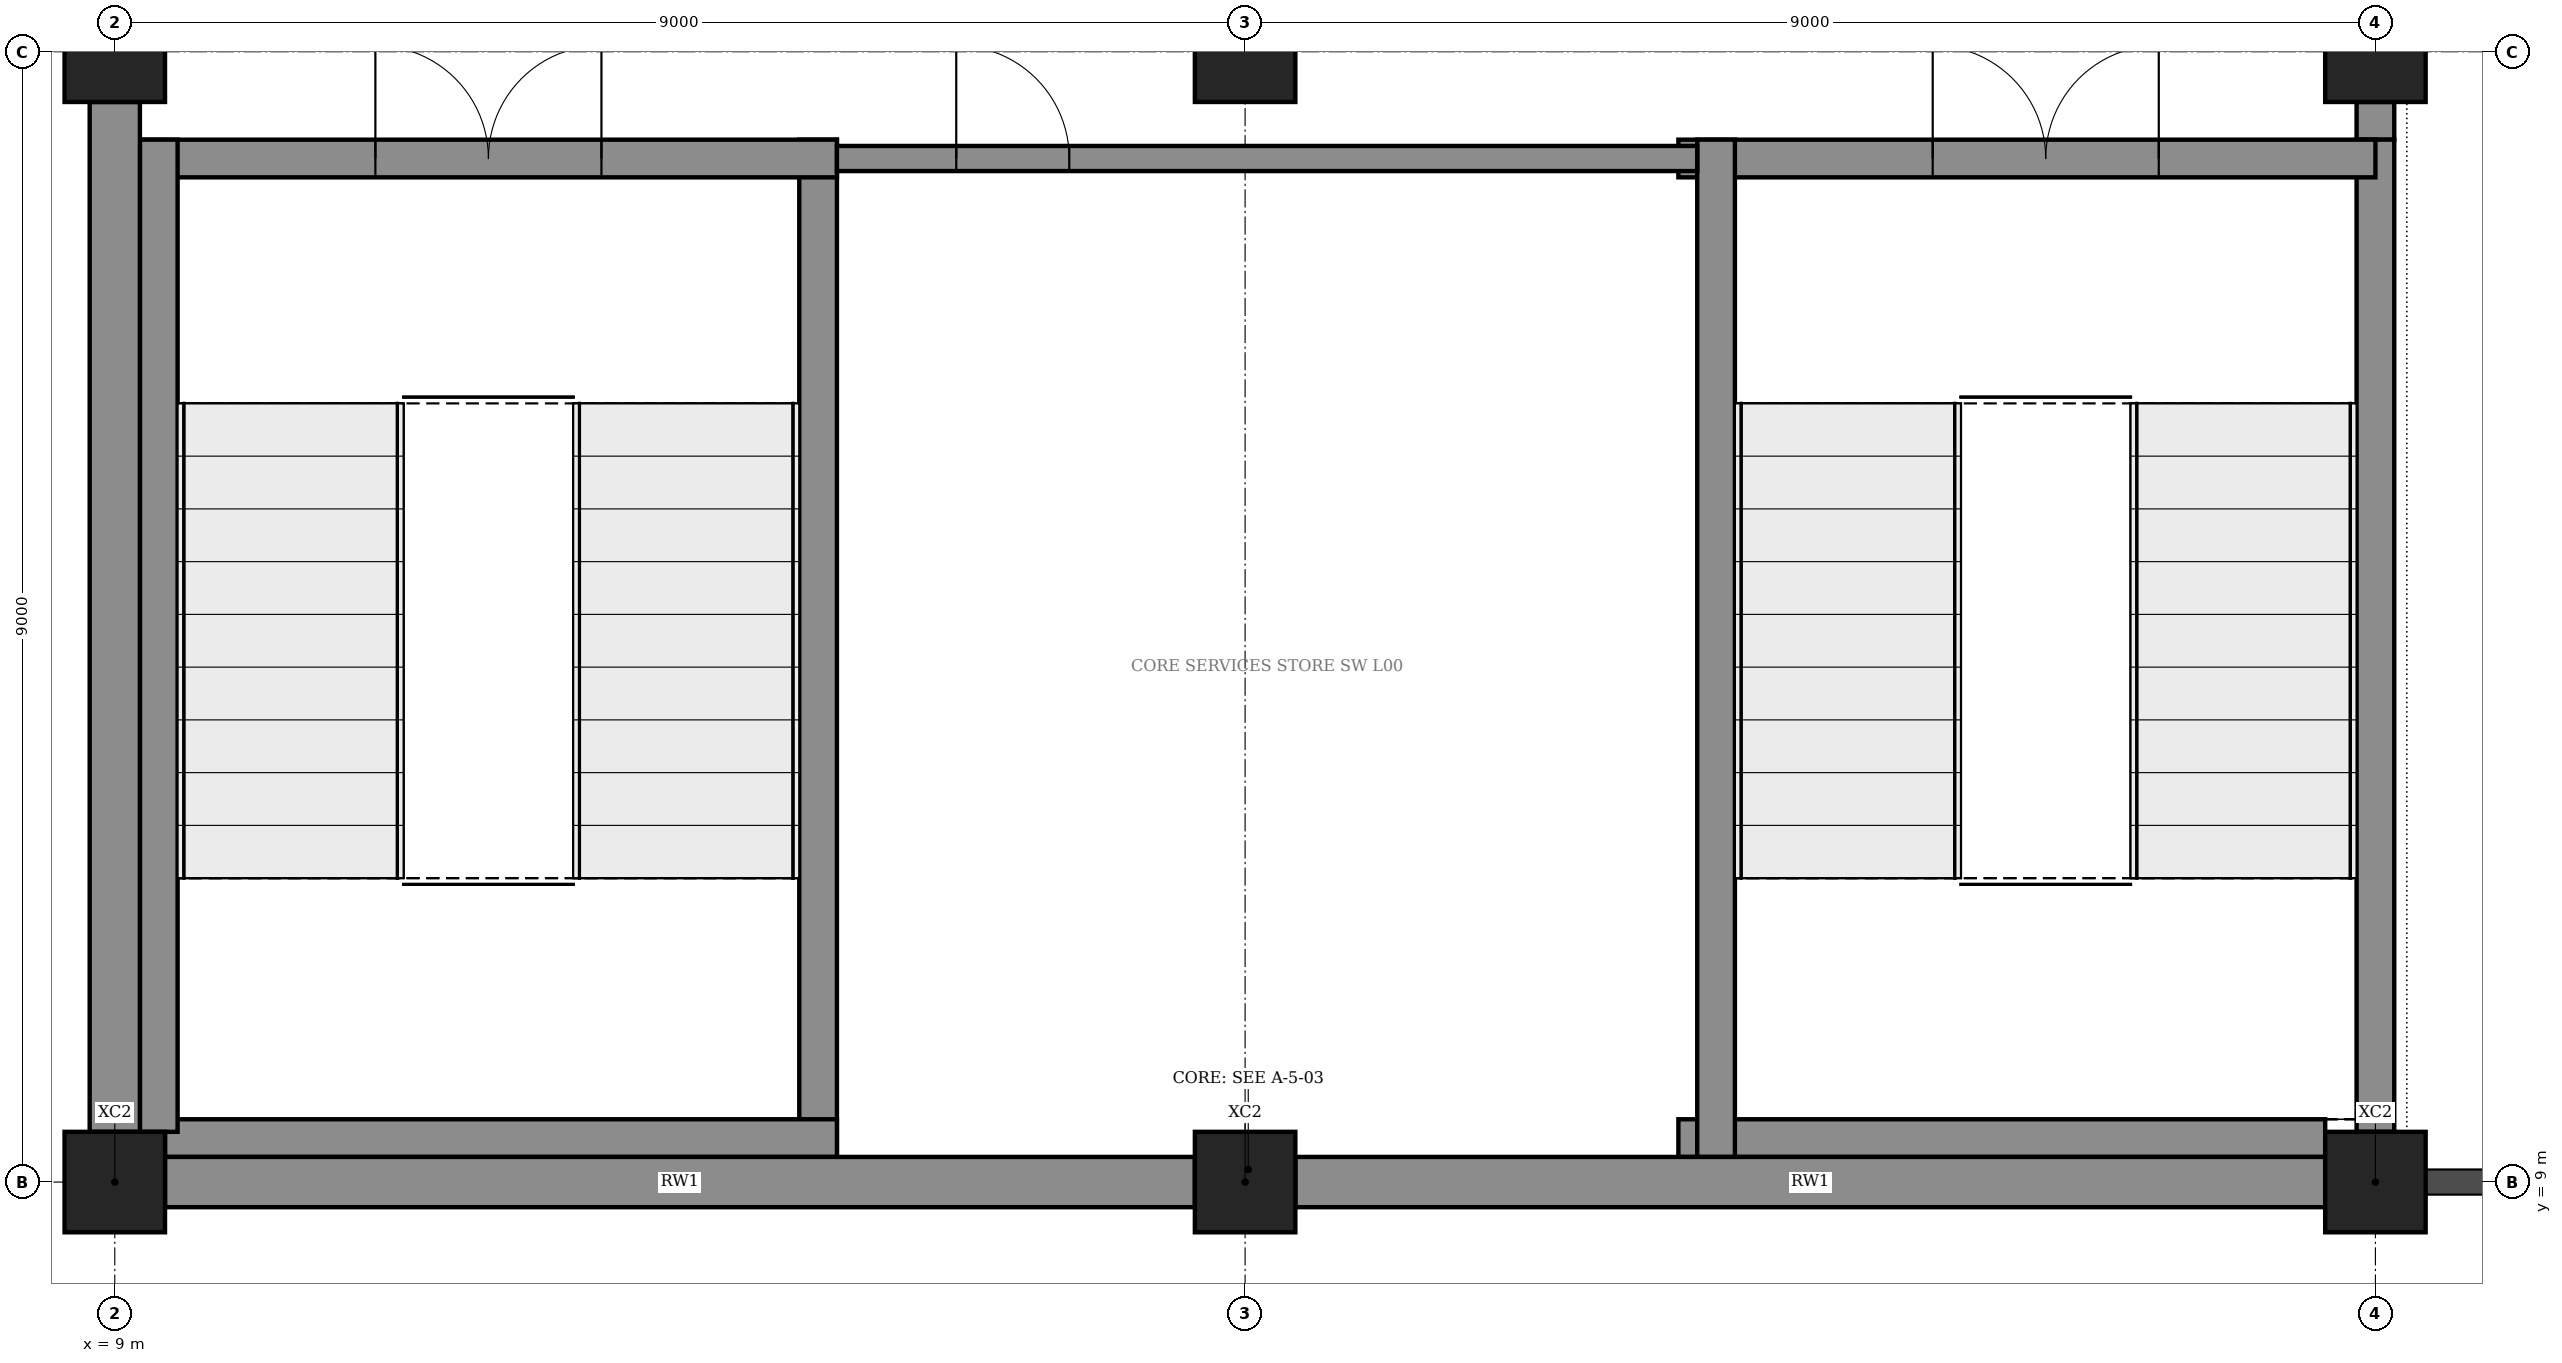
"""IFC4 building model, lengths in metres.
Left out: names, types, materials, properties, quantities, classifications, styles, units other than length and angle.
Written with IfcOpenShell. Run it as: python <this file> out.ifc"""

import sys

from ifc_helpers import new_model, si_unit, direction, frame, frame_2d, origin, origin_2d, place, context, subcontext, project, spatial, rectangle, extrude, element, fill, save


model = new_model("IFC4")
c1 = context("Model", 3, precision=1e-05, world=origin(), true_north=direction((0.0, 1.0)))
c2 = subcontext(c1, "Body", "Model", "MODEL_VIEW")
j1 = project(units=[si_unit("LENGTHUNIT", "METRE"), si_unit("PLANEANGLEUNIT", "RADIAN")], contexts=[c1])
p1 = place(None, origin())
s1 = spatial("IfcSite", under=j1, at=p1, CompositionType="ELEMENT")
p2 = place(p1, origin())
s2 = spatial("IfcBuilding", under=s1, at=p2, CompositionType="ELEMENT")
p3 = place(p2, origin())
s3 = spatial("IfcBuildingStorey", under=s2, at=p3, CompositionType="ELEMENT", Elevation=0.0)
for number, where, z_axis, x_axis in (
    (1, (9.0, 9.0, -0.3), (0.0, 0.0, 1.0), (1.0, 0.0, 0.0)),
    (2, (9.0, 18.0, -0.3), (0.0, 0.0, 1.0), (1.0, 0.0, 0.0)),
    (3, (18.0, 9.0, -0.3), (0.0, 0.0, 1.0), (1.0, 0.0, 0.0)),
    (4, (18.0, 18.0, -0.3), (0.0, 0.0, 1.0), (1.0, 0.0, 0.0)),
    (5, (27.0, 9.0, -0.3), (0.0, 0.0, 1.0), (1.0, 0.0, 0.0)),
    (6, (27.0, 18.0, -0.3), (0.0, 0.0, 1.0), (1.0, 0.0, 0.0)),
):
    element("IfcColumn", number, at=place(p3, frame(where, z_axis=z_axis, x_axis=x_axis)), inside=s3, PredefinedType="COLUMN", context=c2, shape_type="SweptSolid", body=[
        extrude(rectangle(XDim=0.8, YDim=0.8, at=origin_2d()), origin(), (0.0, 0.0, 1.0), 6.3),
    ])
for number, where, z_axis, x_axis in (
    (7, (9.4, 9.0, 0.0), (0.0, 0.0, 1.0), (1.0, 0.0, 0.0)),
    (8, (18.4, 9.0, 0.0), (0.0, 0.0, 1.0), (1.0, 0.0, 0.0)),
    (9, (9.0, 9.4, 0.0), (0.0, 0.0, 1.0), (0.0, 1.0, 0.0)),
):
    element("IfcWall", number, at=place(p3, frame(where, z_axis=z_axis, x_axis=x_axis)), inside=s3, PredefinedType="SOLIDWALL", context=c2, shape_type="SweptSolid", body=[
        extrude(rectangle(XDim=8.2, YDim=0.4, at=frame_2d((4.1, 0.0))), origin(), (0.0, 0.0, 1.0), 4.82),
    ])
p4 = place(p3, frame((9.4, 9.35, 0.0), z_axis=(0.0, 0.0, 1.0), x_axis=(1.0, 0.0, 0.0)))
e10 = element("IfcWall", 10, at=p4, inside=s3, PredefinedType="SOLIDWALL", context=c2, shape_type="SweptSolid", body=[
    extrude(rectangle(XDim=5.35, YDim=0.3, at=frame_2d((2.675, 0.0))), origin(), (0.0, 0.0, 1.0), 5.72),
])
p5 = place(p3, frame((9.2, 17.15, 0.0), z_axis=(0.0, 0.0, 1.0), x_axis=(1.0, 0.0, 0.0)))
e11 = element("IfcWall", 11, at=p5, inside=s3, PredefinedType="SOLIDWALL", context=c2, shape_type="SweptSolid", body=[
    extrude(rectangle(XDim=5.55, YDim=0.3, at=frame_2d((2.775, 0.0))), origin(), (0.0, 0.0, 1.0), 5.72),
])
p6 = place(p5, frame((1.875, 0.0, 0.0)))
e12 = element("IfcOpeningElement", 12, at=p6, cuts=e11, PredefinedType="OPENING", context=c2, shape_type="SweptSolid", body=[
    extrude(rectangle(XDim=1.8, YDim=2.4, at=frame_2d((0.9, 1.2))), frame((0.0, 0.16, 0.0), z_axis=(0.0, -1.0, 0.0), x_axis=(1.0, 0.0, 0.0)), (0.0, 0.0, 1.0), 0.32),
])
p7 = place(p3, frame((9.35, 9.4, 0.0), z_axis=(0.0, 0.0, 1.0), x_axis=(0.0, 1.0, 0.0)))
e13 = element("IfcWall", 13, at=p7, inside=s3, PredefinedType="SOLIDWALL", context=c2, shape_type="SweptSolid", body=[
    extrude(rectangle(XDim=7.9, YDim=0.3, at=frame_2d((3.95, 0.0))), origin(), (0.0, 0.0, 1.0), 5.72),
])
p8 = place(p3, frame((14.6, 9.2, 0.0), z_axis=(0.0, 0.0, 1.0), x_axis=(0.0, 1.0, 0.0)))
e14 = element("IfcWall", 14, at=p8, inside=s3, PredefinedType="SOLIDWALL", context=c2, shape_type="SweptSolid", body=[
    extrude(rectangle(XDim=8.1, YDim=0.3, at=frame_2d((4.05, 0.0))), origin(), (0.0, 0.0, 1.0), 5.72),
])
p9 = place(p3, frame((21.45, 9.35, 0.0), z_axis=(0.0, 0.0, 1.0), x_axis=(1.0, 0.0, 0.0)))
e15 = element("IfcWall", 15, at=p9, inside=s3, PredefinedType="SOLIDWALL", context=c2, shape_type="SweptSolid", body=[
    extrude(rectangle(XDim=5.15, YDim=0.3, at=frame_2d((2.575, 0.0))), origin(), (0.0, 0.0, 1.0), 5.72),
])
p10 = place(p3, frame((21.45, 17.15, 0.0), z_axis=(0.0, 0.0, 1.0), x_axis=(1.0, 0.0, 0.0)))
e16 = element("IfcWall", 16, at=p10, inside=s3, PredefinedType="SOLIDWALL", context=c2, shape_type="SweptSolid", body=[
    extrude(rectangle(XDim=5.55, YDim=0.3, at=frame_2d((2.775, 0.0))), origin(), (0.0, 0.0, 1.0), 5.72),
])
p11 = place(p10, frame((2.025, 0.0, 0.0)))
e17 = element("IfcOpeningElement", 17, at=p11, cuts=e16, PredefinedType="OPENING", context=c2, shape_type="SweptSolid", body=[
    extrude(rectangle(XDim=1.8, YDim=2.4, at=frame_2d((0.9, 1.2))), frame((0.0, 0.16, 0.0), z_axis=(0.0, -1.0, 0.0), x_axis=(1.0, 0.0, 0.0)), (0.0, 0.0, 1.0), 0.32),
])
p12 = place(p3, frame((21.75, 9.2, 0.0), z_axis=(0.0, 0.0, 1.0), x_axis=(0.0, 1.0, 0.0)))
e18 = element("IfcWall", 18, at=p12, inside=s3, PredefinedType="SOLIDWALL", context=c2, shape_type="SweptSolid", body=[
    extrude(rectangle(XDim=8.1, YDim=0.3, at=frame_2d((4.05, 0.0))), origin(), (0.0, 0.0, 1.0), 5.72),
])
p13 = place(p3, frame((27.0, 9.4, 0.0), z_axis=(0.0, 0.0, 1.0), x_axis=(0.0, 1.0, 0.0)))
e19 = element("IfcWall", 19, at=p13, inside=s3, PredefinedType="SOLIDWALL", context=c2, shape_type="SweptSolid", body=[
    extrude(rectangle(XDim=7.9, YDim=0.3, at=frame_2d((3.95, 0.0))), origin(), (0.0, 0.0, 1.0), 5.72),
])
p14 = place(p3, frame((14.75, 17.15, 0.0), z_axis=(0.0, 0.0, 1.0), x_axis=(1.0, 0.0, 0.0)))
e20 = element("IfcWall", 20, at=p14, inside=s3, PredefinedType="PARTITIONING", context=c2, shape_type="SweptSolid", body=[
    extrude(rectangle(XDim=6.85, YDim=0.2, at=frame_2d((3.425, 0.0))), origin(), (0.0, 0.0, 1.0), 5.72),
])
p15 = place(p14, frame((0.95, 0.0, 0.0)))
e21 = element("IfcOpeningElement", 21, at=p15, cuts=e20, PredefinedType="OPENING", context=c2, shape_type="SweptSolid", body=[
    extrude(rectangle(XDim=0.9, YDim=2.1, at=frame_2d((0.45, 1.05))), frame((0.0, 0.11, 0.0), z_axis=(0.0, -1.0, 0.0), x_axis=(1.0, 0.0, 0.0)), (0.0, 0.0, 1.0), 0.22),
])
p16 = place(p3, frame((27.0, 17.3, 0.0), z_axis=(0.0, 0.0, 1.0), x_axis=(0.0, 1.0, 0.0)))
e22 = element("IfcWall", 22, at=p16, inside=s3, PredefinedType="SOLIDWALL", context=c2, shape_type="SweptSolid", body=[
    extrude(rectangle(XDim=0.3, YDim=0.3, at=frame_2d((0.15, 0.0))), origin(), (0.0, 0.0, 1.0), 4.82),
])
p17 = place(p6, origin())
e23 = element("IfcDoor", 23, at=p17, inside=s3, OperationType="DOUBLE_DOOR_SINGLE_SWING", PredefinedType="DOOR", context=c2, shape_type="SweptSolid", body=[
    extrude(rectangle(XDim=1.8, YDim=2.4, at=frame_2d((0.9, 1.2))), frame((0.0, 0.025, 0.0), z_axis=(0.0, -1.0, 0.0), x_axis=(1.0, 0.0, 0.0)), (0.0, 0.0, 1.0), 0.05),
])
fill(e12, e23)
p18 = place(p11, origin())
e24 = element("IfcDoor", 24, at=p18, inside=s3, OperationType="DOUBLE_DOOR_SINGLE_SWING", PredefinedType="DOOR", context=c2, shape_type="SweptSolid", body=[
    extrude(rectangle(XDim=1.8, YDim=2.4, at=frame_2d((0.9, 1.2))), frame((0.0, 0.025, 0.0), z_axis=(0.0, -1.0, 0.0), x_axis=(1.0, 0.0, 0.0)), (0.0, 0.0, 1.0), 0.05),
])
fill(e17, e24)
p19 = place(p15, origin())
e25 = element("IfcDoor", 25, at=p19, inside=s3, OperationType="SINGLE_SWING_LEFT", PredefinedType="DOOR", context=c2, shape_type="SweptSolid", body=[
    extrude(rectangle(XDim=0.9, YDim=2.1, at=frame_2d((0.45, 1.05))), frame((0.0, 0.025, 0.0), z_axis=(0.0, -1.0, 0.0), x_axis=(1.0, 0.0, 0.0)), (0.0, 0.0, 1.0), 0.05),
])
fill(e21, e25)
save(model, sys.argv[1])
